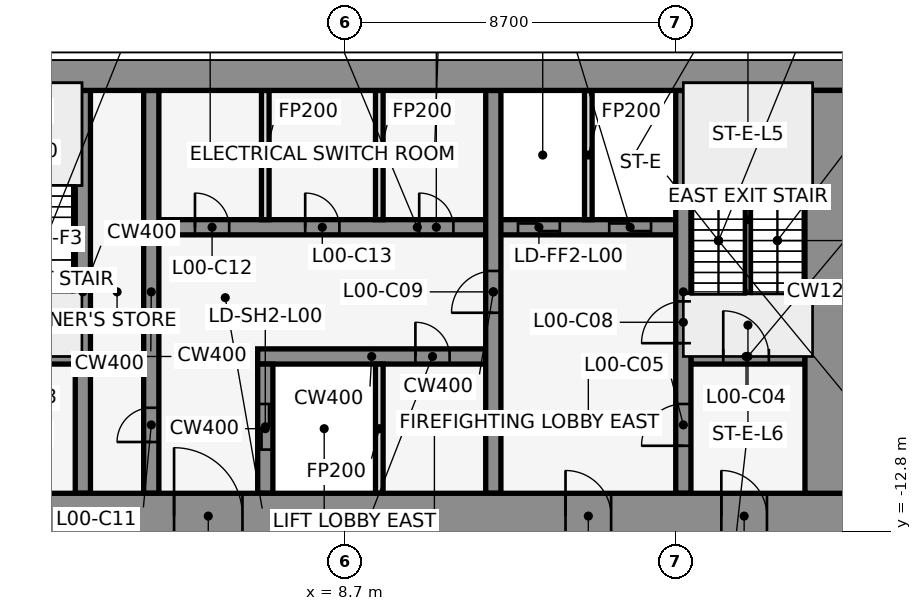
"""IFC4 building model, lengths in metres.
Left out: names, types, materials, properties, quantities, classifications, styles, units other than length and angle.
Written with IfcOpenShell. Run it as: python <this file> out.ifc"""

import sys

from ifc_helpers import new_model, si_unit, direction, frame, frame_2d, origin, place, context, subcontext, project, spatial, rectangle, extrude, element, fill, save


model = new_model("IFC4")
c1 = context("Model", 3, precision=1e-05, world=origin(), true_north=direction((0.0, 1.0)))
c2 = subcontext(c1, "Body", "Model", "MODEL_VIEW")
j1 = project(units=[si_unit("LENGTHUNIT", "METRE"), si_unit("PLANEANGLEUNIT", "RADIAN")], contexts=[c1])
p1 = place(None, origin())
s1 = spatial("IfcSite", under=j1, at=p1, CompositionType="ELEMENT")
p2 = place(p1, origin())
s2 = spatial("IfcBuilding", under=s1, at=p2, CompositionType="ELEMENT")
p3 = place(p2, origin())
s3 = spatial("IfcBuildingStorey", under=s2, at=p3, CompositionType="ELEMENT", Elevation=0.0)
p4 = place(p3, frame((-1.6, -8.2, 0.0), z_axis=(0.0, 0.0, 1.0), x_axis=(1.0, 0.0, 0.0)))
e1 = element("IfcWall", 1, at=p4, inside=s3, PredefinedType="SHEAR", context=c2, shape_type="SweptSolid", body=[
    extrude(rectangle(XDim=3.2, YDim=0.4, at=frame_2d((1.6, 0.0))), origin(), (0.0, 0.0, 1.0), 8.0),
])
p5 = place(p4, frame((1.05, 0.0, 0.0)))
e2 = element("IfcOpeningElement", 2, at=p5, cuts=e1, PredefinedType="OPENING", context=c2, shape_type="SweptSolid", body=[
    extrude(rectangle(XDim=1.2, YDim=2.1, at=frame_2d((0.6, 1.05))), frame((0.0, 0.212, 0.0), z_axis=(0.0, -1.0, 0.0), x_axis=(1.0, 0.0, 0.0)), (0.0, 0.0, 1.0), 0.424),
])
p6 = place(p3, frame((6.4, -8.2, 0.0), z_axis=(0.0, 0.0, 1.0), x_axis=(1.0, 0.0, 0.0)))
e3 = element("IfcWall", 3, at=p6, inside=s3, PredefinedType="SHEAR", context=c2, shape_type="SweptSolid", body=[
    extrude(rectangle(XDim=6.0, YDim=0.4, at=frame_2d((3.0, 0.0))), origin(), (0.0, 0.0, 1.0), 8.0),
])
p7 = place(p6, frame((4.15, 0.0, 0.0)))
e4 = element("IfcOpeningElement", 4, at=p7, cuts=e3, PredefinedType="OPENING", context=c2, shape_type="SweptSolid", body=[
    extrude(rectangle(XDim=0.9, YDim=2.1, at=frame_2d((0.45, 1.05))), frame((0.0, 0.212, 0.0), z_axis=(0.0, -1.0, 0.0), x_axis=(1.0, 0.0, 0.0)), (0.0, 0.0, 1.0), 0.424),
])
p8 = place(p3, frame((17.8, -8.2, 0.0), z_axis=(0.0, 0.0, 1.0), x_axis=(1.0, 0.0, 0.0)))
e5 = element("IfcWall", 5, at=p8, inside=s3, PredefinedType="SHEAR", context=c2, shape_type="SweptSolid", body=[
    extrude(rectangle(XDim=3.0, YDim=0.4, at=frame_2d((1.5, 0.0))), origin(), (0.0, 0.0, 1.0), 8.0),
])
p9 = place(p8, frame((0.85, 0.0, 0.0)))
e6 = element("IfcOpeningElement", 6, at=p9, cuts=e5, PredefinedType="OPENING", context=c2, shape_type="SweptSolid", body=[
    extrude(rectangle(XDim=1.2, YDim=2.1, at=frame_2d((0.6, 1.05))), frame((0.0, 0.212, 0.0), z_axis=(0.0, -1.0, 0.0), x_axis=(1.0, 0.0, 0.0)), (0.0, 0.0, 1.0), 0.424),
])
p10 = place(p3, frame((3.8, -4.8, 0.0), z_axis=(0.0, 0.0, 1.0), x_axis=(1.0, 0.0, 0.0)))
e7 = element("IfcWall", 7, at=p10, inside=s3, PredefinedType="SHEAR", context=c2, shape_type="SweptSolid", body=[
    extrude(rectangle(XDim=13.6, YDim=0.4, at=frame_2d((6.8, 0.0))), origin(), (0.0, 0.0, 1.0), 8.0),
])
p11 = place(p10, frame((9.45, 0.0, 0.0)))
e8 = element("IfcOpeningElement", 8, at=p11, cuts=e7, PredefinedType="OPENING", context=c2, shape_type="SweptSolid", body=[
    extrude(rectangle(XDim=1.1, YDim=2.1, at=frame_2d((0.55, 1.05))), frame((0.0, 0.212, 0.0), z_axis=(0.0, -1.0, 0.0), x_axis=(1.0, 0.0, 0.0)), (0.0, 0.0, 1.0), 0.424),
])
p12 = place(p10, frame((11.85, 0.0, 0.0)))
e9 = element("IfcOpeningElement", 9, at=p12, cuts=e7, PredefinedType="OPENING", context=c2, shape_type="SweptSolid", body=[
    extrude(rectangle(XDim=1.1, YDim=2.1, at=frame_2d((0.55, 1.05))), frame((0.0, 0.212, 0.0), z_axis=(0.0, -1.0, 0.0), x_axis=(1.0, 0.0, 0.0)), (0.0, 0.0, 1.0), 0.424),
])
p13 = place(p10, frame((0.95, 0.0, 0.0)))
e10 = element("IfcOpeningElement", 10, at=p13, cuts=e7, PredefinedType="OPENING", context=c2, shape_type="SweptSolid", body=[
    extrude(rectangle(XDim=0.9, YDim=2.1, at=frame_2d((0.45, 1.05))), frame((0.0, 0.212, 0.0), z_axis=(0.0, -1.0, 0.0), x_axis=(1.0, 0.0, 0.0)), (0.0, 0.0, 1.0), 0.424),
])
p14 = place(p10, frame((3.85, 0.0, 0.0)))
e11 = element("IfcOpeningElement", 11, at=p14, cuts=e7, PredefinedType="OPENING", context=c2, shape_type="SweptSolid", body=[
    extrude(rectangle(XDim=0.9, YDim=2.1, at=frame_2d((0.45, 1.05))), frame((0.0, 0.212, 0.0), z_axis=(0.0, -1.0, 0.0), x_axis=(1.0, 0.0, 0.0)), (0.0, 0.0, 1.0), 0.424),
])
p15 = place(p10, frame((6.85, 0.0, 0.0)))
e12 = element("IfcOpeningElement", 12, at=p15, cuts=e7, PredefinedType="OPENING", context=c2, shape_type="SweptSolid", body=[
    extrude(rectangle(XDim=0.9, YDim=2.1, at=frame_2d((0.45, 1.05))), frame((0.0, 0.212, 0.0), z_axis=(0.0, -1.0, 0.0), x_axis=(1.0, 0.0, 0.0)), (0.0, 0.0, 1.0), 0.424),
])
p16 = place(p3, frame((1.8, -11.8, 0.0), z_axis=(0.0, 0.0, 1.0), x_axis=(0.0, 1.0, 0.0)))
e13 = element("IfcWall", 13, at=p16, inside=s3, PredefinedType="SHEAR", context=c2, shape_type="SweptSolid", body=[
    extrude(rectangle(XDim=10.6, YDim=0.4, at=frame_2d((5.3, 0.0))), origin(), (0.0, 0.0, 1.0), 8.0),
])
p17 = place(p3, frame((3.6, -11.8, 0.0), z_axis=(0.0, 0.0, 1.0), x_axis=(0.0, 1.0, 0.0)))
e14 = element("IfcWall", 14, at=p17, inside=s3, PredefinedType="SHEAR", context=c2, shape_type="SweptSolid", body=[
    extrude(rectangle(XDim=10.6, YDim=0.4, at=frame_2d((5.3, 0.0))), origin(), (0.0, 0.0, 1.0), 8.0),
])
p18 = place(p17, frame((1.35, 0.0, 0.0)))
e15 = element("IfcOpeningElement", 15, at=p18, cuts=e14, PredefinedType="OPENING", context=c2, shape_type="SweptSolid", body=[
    extrude(rectangle(XDim=0.9, YDim=2.1, at=frame_2d((0.45, 1.05))), frame((0.0, 0.212, 0.0), z_axis=(0.0, -1.0, 0.0), x_axis=(1.0, 0.0, 0.0)), (0.0, 0.0, 1.0), 0.424),
])
p19 = place(p3, frame((6.6, -11.8, 0.0), z_axis=(0.0, 0.0, 1.0), x_axis=(0.0, 1.0, 0.0)))
e16 = element("IfcWall", 16, at=p19, inside=s3, PredefinedType="SHEAR", context=c2, shape_type="SweptSolid", body=[
    extrude(rectangle(XDim=3.4, YDim=0.4, at=frame_2d((1.7, 0.0))), origin(), (0.0, 0.0, 1.0), 8.0),
])
p20 = place(p19, frame((1.15, 0.0, 0.0)))
e17 = element("IfcOpeningElement", 17, at=p20, cuts=e16, PredefinedType="OPENING", context=c2, shape_type="SweptSolid", body=[
    extrude(rectangle(XDim=1.2, YDim=2.1, at=frame_2d((0.6, 1.05))), frame((0.0, 0.212, 0.0), z_axis=(0.0, -1.0, 0.0), x_axis=(1.0, 0.0, 0.0)), (0.0, 0.0, 1.0), 0.424),
])
for number, where, z_axis, x_axis in (
    (18, (6.6, -4.6, 0.0), (0.0, 0.0, 1.0), (0.0, 1.0, 0.0)),
    (19, (9.6, -11.8, 0.0), (0.0, 0.0, 1.0), (0.0, 1.0, 0.0)),
    (20, (9.6, -4.6, 0.0), (0.0, 0.0, 1.0), (0.0, 1.0, 0.0)),
):
    element("IfcWall", number, at=place(p3, frame(where, z_axis=z_axis, x_axis=x_axis)), inside=s3, PredefinedType="PARTITIONING", context=c2, shape_type="SweptSolid", body=[
        extrude(rectangle(XDim=3.4, YDim=0.2, at=frame_2d((1.7, 0.0))), origin(), (0.0, 0.0, 1.0), 7.7),
    ])
p21 = place(p3, frame((12.6, -11.8, 0.0), z_axis=(0.0, 0.0, 1.0), x_axis=(0.0, 1.0, 0.0)))
e21 = element("IfcWall", 21, at=p21, inside=s3, PredefinedType="SHEAR", context=c2, shape_type="SweptSolid", body=[
    extrude(rectangle(XDim=10.6, YDim=0.4, at=frame_2d((5.3, 0.0))), origin(), (0.0, 0.0, 1.0), 8.0),
])
p22 = place(p21, frame((4.75, 0.0, 0.0)))
e22 = element("IfcOpeningElement", 22, at=p22, cuts=e21, PredefinedType="OPENING", context=c2, shape_type="SweptSolid", body=[
    extrude(rectangle(XDim=1.1, YDim=2.1, at=frame_2d((0.55, 1.05))), frame((0.0, 0.212, 0.0), z_axis=(0.0, -1.0, 0.0), x_axis=(1.0, 0.0, 0.0)), (0.0, 0.0, 1.0), 0.424),
])
p23 = place(p3, frame((15.1, -4.6, 0.0), z_axis=(0.0, 0.0, 1.0), x_axis=(0.0, 1.0, 0.0)))
e23 = element("IfcWall", 23, at=p23, inside=s3, PredefinedType="PARTITIONING", context=c2, shape_type="SweptSolid", body=[
    extrude(rectangle(XDim=3.4, YDim=0.2, at=frame_2d((1.7, 0.0))), origin(), (0.0, 0.0, 1.0), 7.7),
])
p24 = place(p3, frame((17.6, -11.8, 0.0), z_axis=(0.0, 0.0, 1.0), x_axis=(0.0, 1.0, 0.0)))
e24 = element("IfcWall", 24, at=p24, inside=s3, PredefinedType="SHEAR", context=c2, shape_type="SweptSolid", body=[
    extrude(rectangle(XDim=10.6, YDim=0.4, at=frame_2d((5.3, 0.0))), origin(), (0.0, 0.0, 1.0), 8.0),
])
p25 = place(p24, frame((1.25, 0.0, 0.0)))
e25 = element("IfcOpeningElement", 25, at=p25, cuts=e24, PredefinedType="OPENING", context=c2, shape_type="SweptSolid", body=[
    extrude(rectangle(XDim=1.1, YDim=2.1, at=frame_2d((0.55, 1.05))), frame((0.0, 0.212, 0.0), z_axis=(0.0, -1.0, 0.0), x_axis=(1.0, 0.0, 0.0)), (0.0, 0.0, 1.0), 0.424),
])
p26 = place(p24, frame((3.95, 0.0, 0.0)))
e26 = element("IfcOpeningElement", 26, at=p26, cuts=e24, PredefinedType="OPENING", context=c2, shape_type="SweptSolid", body=[
    extrude(rectangle(XDim=1.1, YDim=2.1, at=frame_2d((0.55, 1.05))), frame((0.0, 0.212, 0.0), z_axis=(0.0, -1.0, 0.0), x_axis=(1.0, 0.0, 0.0)), (0.0, 0.0, 1.0), 0.424),
])
p27 = place(p3, frame((-22.0, -0.6, 0.0), z_axis=(0.0, 0.0, 1.0), x_axis=(1.0, 0.0, 0.0)))
e27 = element("IfcWall", 27, at=p27, inside=s3, PredefinedType="SHEAR", context=c2, shape_type="SweptSolid", body=[
    extrude(rectangle(XDim=44.0, YDim=1.2, at=frame_2d((22.0, 0.0))), origin(), (0.0, 0.0, 1.0), 8.0),
])
p28 = place(p3, frame((-22.0, -12.4, 0.0), z_axis=(0.0, 0.0, 1.0), x_axis=(1.0, 0.0, 0.0)))
e28 = element("IfcWall", 28, at=p28, inside=s3, PredefinedType="SHEAR", context=c2, shape_type="SweptSolid", body=[
    extrude(rectangle(XDim=44.0, YDim=1.2, at=frame_2d((22.0, 0.0))), origin(), (0.0, 0.0, 1.0), 8.0),
])
p29 = place(p28, frame((2.2, 0.0, 0.0)))
e29 = element("IfcOpeningElement", 29, at=p29, cuts=e28, PredefinedType="OPENING", context=c2, shape_type="SweptSolid", body=[
    extrude(rectangle(XDim=1.2, YDim=2.1, at=frame_2d((0.6, 1.05))), frame((0.0, 0.612, 0.0), z_axis=(0.0, -1.0, 0.0), x_axis=(1.0, 0.0, 0.0)), (0.0, 0.0, 1.0), 1.224),
])
p30 = place(p28, frame((21.4, 0.0, 0.0)))
e30 = element("IfcOpeningElement", 30, at=p30, cuts=e28, PredefinedType="OPENING", context=c2, shape_type="SweptSolid", body=[
    extrude(rectangle(XDim=1.2, YDim=2.1, at=frame_2d((0.6, 1.05))), frame((0.0, 0.612, 0.0), z_axis=(0.0, -1.0, 0.0), x_axis=(1.0, 0.0, 0.0)), (0.0, 0.0, 1.0), 1.224),
])
p31 = place(p28, frame((40.6, 0.0, 0.0)))
e31 = element("IfcOpeningElement", 31, at=p31, cuts=e28, PredefinedType="OPENING", context=c2, shape_type="SweptSolid", body=[
    extrude(rectangle(XDim=1.2, YDim=2.1, at=frame_2d((0.6, 1.05))), frame((0.0, 0.612, 0.0), z_axis=(0.0, -1.0, 0.0), x_axis=(1.0, 0.0, 0.0)), (0.0, 0.0, 1.0), 1.224),
])
p32 = place(p28, frame((16.0, 0.0, 0.0)))
e32 = element("IfcOpeningElement", 32, at=p32, cuts=e28, PredefinedType="OPENING", context=c2, shape_type="SweptSolid", body=[
    extrude(rectangle(XDim=1.8, YDim=2.1, at=frame_2d((0.9, 1.05))), frame((0.0, 0.612, 0.0), z_axis=(0.0, -1.0, 0.0), x_axis=(1.0, 0.0, 0.0)), (0.0, 0.0, 1.0), 1.224),
])
p33 = place(p28, frame((6.3, 0.0, 0.0)))
e33 = element("IfcOpeningElement", 33, at=p33, cuts=e28, PredefinedType="OPENING", context=c2, shape_type="SweptSolid", body=[
    extrude(rectangle(XDim=1.2, YDim=2.1, at=frame_2d((0.6, 1.05))), frame((0.0, 0.612, 0.0), z_axis=(0.0, -1.0, 0.0), x_axis=(1.0, 0.0, 0.0)), (0.0, 0.0, 1.0), 1.224),
])
p34 = place(p28, frame((26.2, 0.0, 0.0)))
e34 = element("IfcOpeningElement", 34, at=p34, cuts=e28, PredefinedType="OPENING", context=c2, shape_type="SweptSolid", body=[
    extrude(rectangle(XDim=1.8, YDim=2.1, at=frame_2d((0.9, 1.05))), frame((0.0, 0.612, 0.0), z_axis=(0.0, -1.0, 0.0), x_axis=(1.0, 0.0, 0.0)), (0.0, 0.0, 1.0), 1.224),
])
p35 = place(p28, frame((36.5, 0.0, 0.0)))
e35 = element("IfcOpeningElement", 35, at=p35, cuts=e28, PredefinedType="OPENING", context=c2, shape_type="SweptSolid", body=[
    extrude(rectangle(XDim=1.2, YDim=2.1, at=frame_2d((0.6, 1.05))), frame((0.0, 0.612, 0.0), z_axis=(0.0, -1.0, 0.0), x_axis=(1.0, 0.0, 0.0)), (0.0, 0.0, 1.0), 1.224),
])
p36 = place(p3, frame((21.4, -11.8, 0.0), z_axis=(0.0, 0.0, 1.0), x_axis=(0.0, 1.0, 0.0)))
e36 = element("IfcWall", 36, at=p36, inside=s3, PredefinedType="SHEAR", context=c2, shape_type="SweptSolid", body=[
    extrude(rectangle(XDim=10.6, YDim=1.2, at=frame_2d((5.3, 0.0))), origin(), (0.0, 0.0, 1.0), 8.0),
])
p37 = place(p9, origin())
e37 = element("IfcDoor", 37, at=p37, inside=s3, OperationType="SINGLE_SWING_RIGHT", PredefinedType="DOOR", context=c2, shape_type="SweptSolid", body=[
    extrude(rectangle(XDim=1.2, YDim=2.1, at=frame_2d((0.6, 1.05))), frame((0.0, 0.025, 0.0), z_axis=(0.0, -1.0, 0.0), x_axis=(1.0, 0.0, 0.0)), (0.0, 0.0, 1.0), 0.05),
])
fill(e6, e37)
p38 = place(p25, origin())
e38 = element("IfcDoor", 38, at=p38, inside=s3, OperationType="SINGLE_SWING_LEFT", PredefinedType="DOOR", context=c2, shape_type="SweptSolid", body=[
    extrude(rectangle(XDim=1.1, YDim=2.1, at=frame_2d((0.55, 1.05))), frame((0.0, 0.025, 0.0), z_axis=(0.0, -1.0, 0.0), x_axis=(1.0, 0.0, 0.0)), (0.0, 0.0, 1.0), 0.05),
])
fill(e25, e38)
p39 = place(p20, origin())
e39 = element("IfcDoor", 39, at=p39, inside=s3, OperationType="DOUBLE_DOOR_SLIDING", PredefinedType="DOOR", context=c2, shape_type="SweptSolid", body=[
    extrude(rectangle(XDim=1.2, YDim=2.1, at=frame_2d((0.6, 1.05))), frame((0.0, 0.025, 0.0), z_axis=(0.0, -1.0, 0.0), x_axis=(1.0, 0.0, 0.0)), (0.0, 0.0, 1.0), 0.05),
])
fill(e17, e39)
p40 = place(p11, origin())
e40 = element("IfcDoor", 40, at=p40, inside=s3, OperationType="DOUBLE_DOOR_SLIDING", PredefinedType="DOOR", context=c2, shape_type="SweptSolid", body=[
    extrude(rectangle(XDim=1.1, YDim=2.1, at=frame_2d((0.55, 1.05))), frame((0.0, 0.025, 0.0), z_axis=(0.0, -1.0, 0.0), x_axis=(1.0, 0.0, 0.0)), (0.0, 0.0, 1.0), 0.05),
])
fill(e8, e40)
p41 = place(p12, origin())
e41 = element("IfcDoor", 41, at=p41, inside=s3, OperationType="DOUBLE_DOOR_SLIDING", PredefinedType="DOOR", context=c2, shape_type="SweptSolid", body=[
    extrude(rectangle(XDim=1.1, YDim=2.1, at=frame_2d((0.55, 1.05))), frame((0.0, 0.025, 0.0), z_axis=(0.0, -1.0, 0.0), x_axis=(1.0, 0.0, 0.0)), (0.0, 0.0, 1.0), 0.05),
])
fill(e9, e41)
p42 = place(p26, origin())
e42 = element("IfcDoor", 42, at=p42, inside=s3, OperationType="SINGLE_SWING_RIGHT", PredefinedType="DOOR", context=c2, shape_type="SweptSolid", body=[
    extrude(rectangle(XDim=1.1, YDim=2.1, at=frame_2d((0.55, 1.05))), frame((0.0, 0.025, 0.0), z_axis=(0.0, -1.0, 0.0), x_axis=(1.0, 0.0, 0.0)), (0.0, 0.0, 1.0), 0.05),
])
fill(e26, e42)
p43 = place(p22, frame((1.1, 0.0, 0.0), z_axis=(0.0, 0.0, 1.0), x_axis=(-1.0, 0.0, 0.0)))
e43 = element("IfcDoor", 43, at=p43, inside=s3, OperationType="SINGLE_SWING_RIGHT", PredefinedType="DOOR", context=c2, shape_type="SweptSolid", body=[
    extrude(rectangle(XDim=1.1, YDim=2.1, at=frame_2d((0.55, 1.05))), frame((0.0, 0.025, 0.0), z_axis=(0.0, -1.0, 0.0), x_axis=(1.0, 0.0, 0.0)), (0.0, 0.0, 1.0), 0.05),
])
fill(e22, e43)
p44 = place(p18, origin())
e44 = element("IfcDoor", 44, at=p44, inside=s3, OperationType="SINGLE_SWING_LEFT", PredefinedType="DOOR", context=c2, shape_type="SweptSolid", body=[
    extrude(rectangle(XDim=0.9, YDim=2.1, at=frame_2d((0.45, 1.05))), frame((0.0, 0.025, 0.0), z_axis=(0.0, -1.0, 0.0), x_axis=(1.0, 0.0, 0.0)), (0.0, 0.0, 1.0), 0.05),
])
fill(e15, e44)
p45 = place(p13, origin())
e45 = element("IfcDoor", 45, at=p45, inside=s3, OperationType="SINGLE_SWING_RIGHT", PredefinedType="DOOR", context=c2, shape_type="SweptSolid", body=[
    extrude(rectangle(XDim=0.9, YDim=2.1, at=frame_2d((0.45, 1.05))), frame((0.0, 0.025, 0.0), z_axis=(0.0, -1.0, 0.0), x_axis=(1.0, 0.0, 0.0)), (0.0, 0.0, 1.0), 0.05),
])
fill(e10, e45)
p46 = place(p14, origin())
e46 = element("IfcDoor", 46, at=p46, inside=s3, OperationType="SINGLE_SWING_LEFT", PredefinedType="DOOR", context=c2, shape_type="SweptSolid", body=[
    extrude(rectangle(XDim=0.9, YDim=2.1, at=frame_2d((0.45, 1.05))), frame((0.0, 0.025, 0.0), z_axis=(0.0, -1.0, 0.0), x_axis=(1.0, 0.0, 0.0)), (0.0, 0.0, 1.0), 0.05),
])
fill(e11, e46)
p47 = place(p15, origin())
e47 = element("IfcDoor", 47, at=p47, inside=s3, OperationType="SINGLE_SWING_RIGHT", PredefinedType="DOOR", context=c2, shape_type="SweptSolid", body=[
    extrude(rectangle(XDim=0.9, YDim=2.1, at=frame_2d((0.45, 1.05))), frame((0.0, 0.025, 0.0), z_axis=(0.0, -1.0, 0.0), x_axis=(1.0, 0.0, 0.0)), (0.0, 0.0, 1.0), 0.05),
])
fill(e12, e47)
p48 = place(p7, frame((0.9, 0.0, 0.0), z_axis=(0.0, 0.0, 1.0), x_axis=(-1.0, 0.0, 0.0)))
e48 = element("IfcDoor", 48, at=p48, inside=s3, OperationType="SINGLE_SWING_LEFT", PredefinedType="DOOR", context=c2, shape_type="SweptSolid", body=[
    extrude(rectangle(XDim=0.9, YDim=2.1, at=frame_2d((0.45, 1.05))), frame((0.0, 0.025, 0.0), z_axis=(0.0, -1.0, 0.0), x_axis=(1.0, 0.0, 0.0)), (0.0, 0.0, 1.0), 0.05),
])
fill(e4, e48)
p49 = place(p31, frame((1.2, 0.0, 0.0), z_axis=(0.0, 0.0, 1.0), x_axis=(-1.0, 0.0, 0.0)))
e49 = element("IfcDoor", 49, at=p49, inside=s3, OperationType="SINGLE_SWING_RIGHT", PredefinedType="DOOR", context=c2, shape_type="SweptSolid", body=[
    extrude(rectangle(XDim=1.2, YDim=2.1, at=frame_2d((0.6, 1.05))), frame((0.0, 0.025, 0.0), z_axis=(0.0, -1.0, 0.0), x_axis=(1.0, 0.0, 0.0)), (0.0, 0.0, 1.0), 0.05),
])
fill(e31, e49)
p50 = place(p34, origin())
e50 = element("IfcDoor", 50, at=p50, inside=s3, OperationType="SINGLE_SWING_LEFT", PredefinedType="DOOR", context=c2, shape_type="SweptSolid", body=[
    extrude(rectangle(XDim=1.8, YDim=2.1, at=frame_2d((0.9, 1.05))), frame((0.0, 0.025, 0.0), z_axis=(0.0, -1.0, 0.0), x_axis=(1.0, 0.0, 0.0)), (0.0, 0.0, 1.0), 0.05),
])
fill(e34, e50)
p51 = place(p35, frame((1.2, 0.0, 0.0), z_axis=(0.0, 0.0, 1.0), x_axis=(-1.0, 0.0, 0.0)))
e51 = element("IfcDoor", 51, at=p51, inside=s3, OperationType="SINGLE_SWING_RIGHT", PredefinedType="DOOR", context=c2, shape_type="SweptSolid", body=[
    extrude(rectangle(XDim=1.2, YDim=2.1, at=frame_2d((0.6, 1.05))), frame((0.0, 0.025, 0.0), z_axis=(0.0, -1.0, 0.0), x_axis=(1.0, 0.0, 0.0)), (0.0, 0.0, 1.0), 0.05),
])
fill(e35, e51)
save(model, sys.argv[1])
